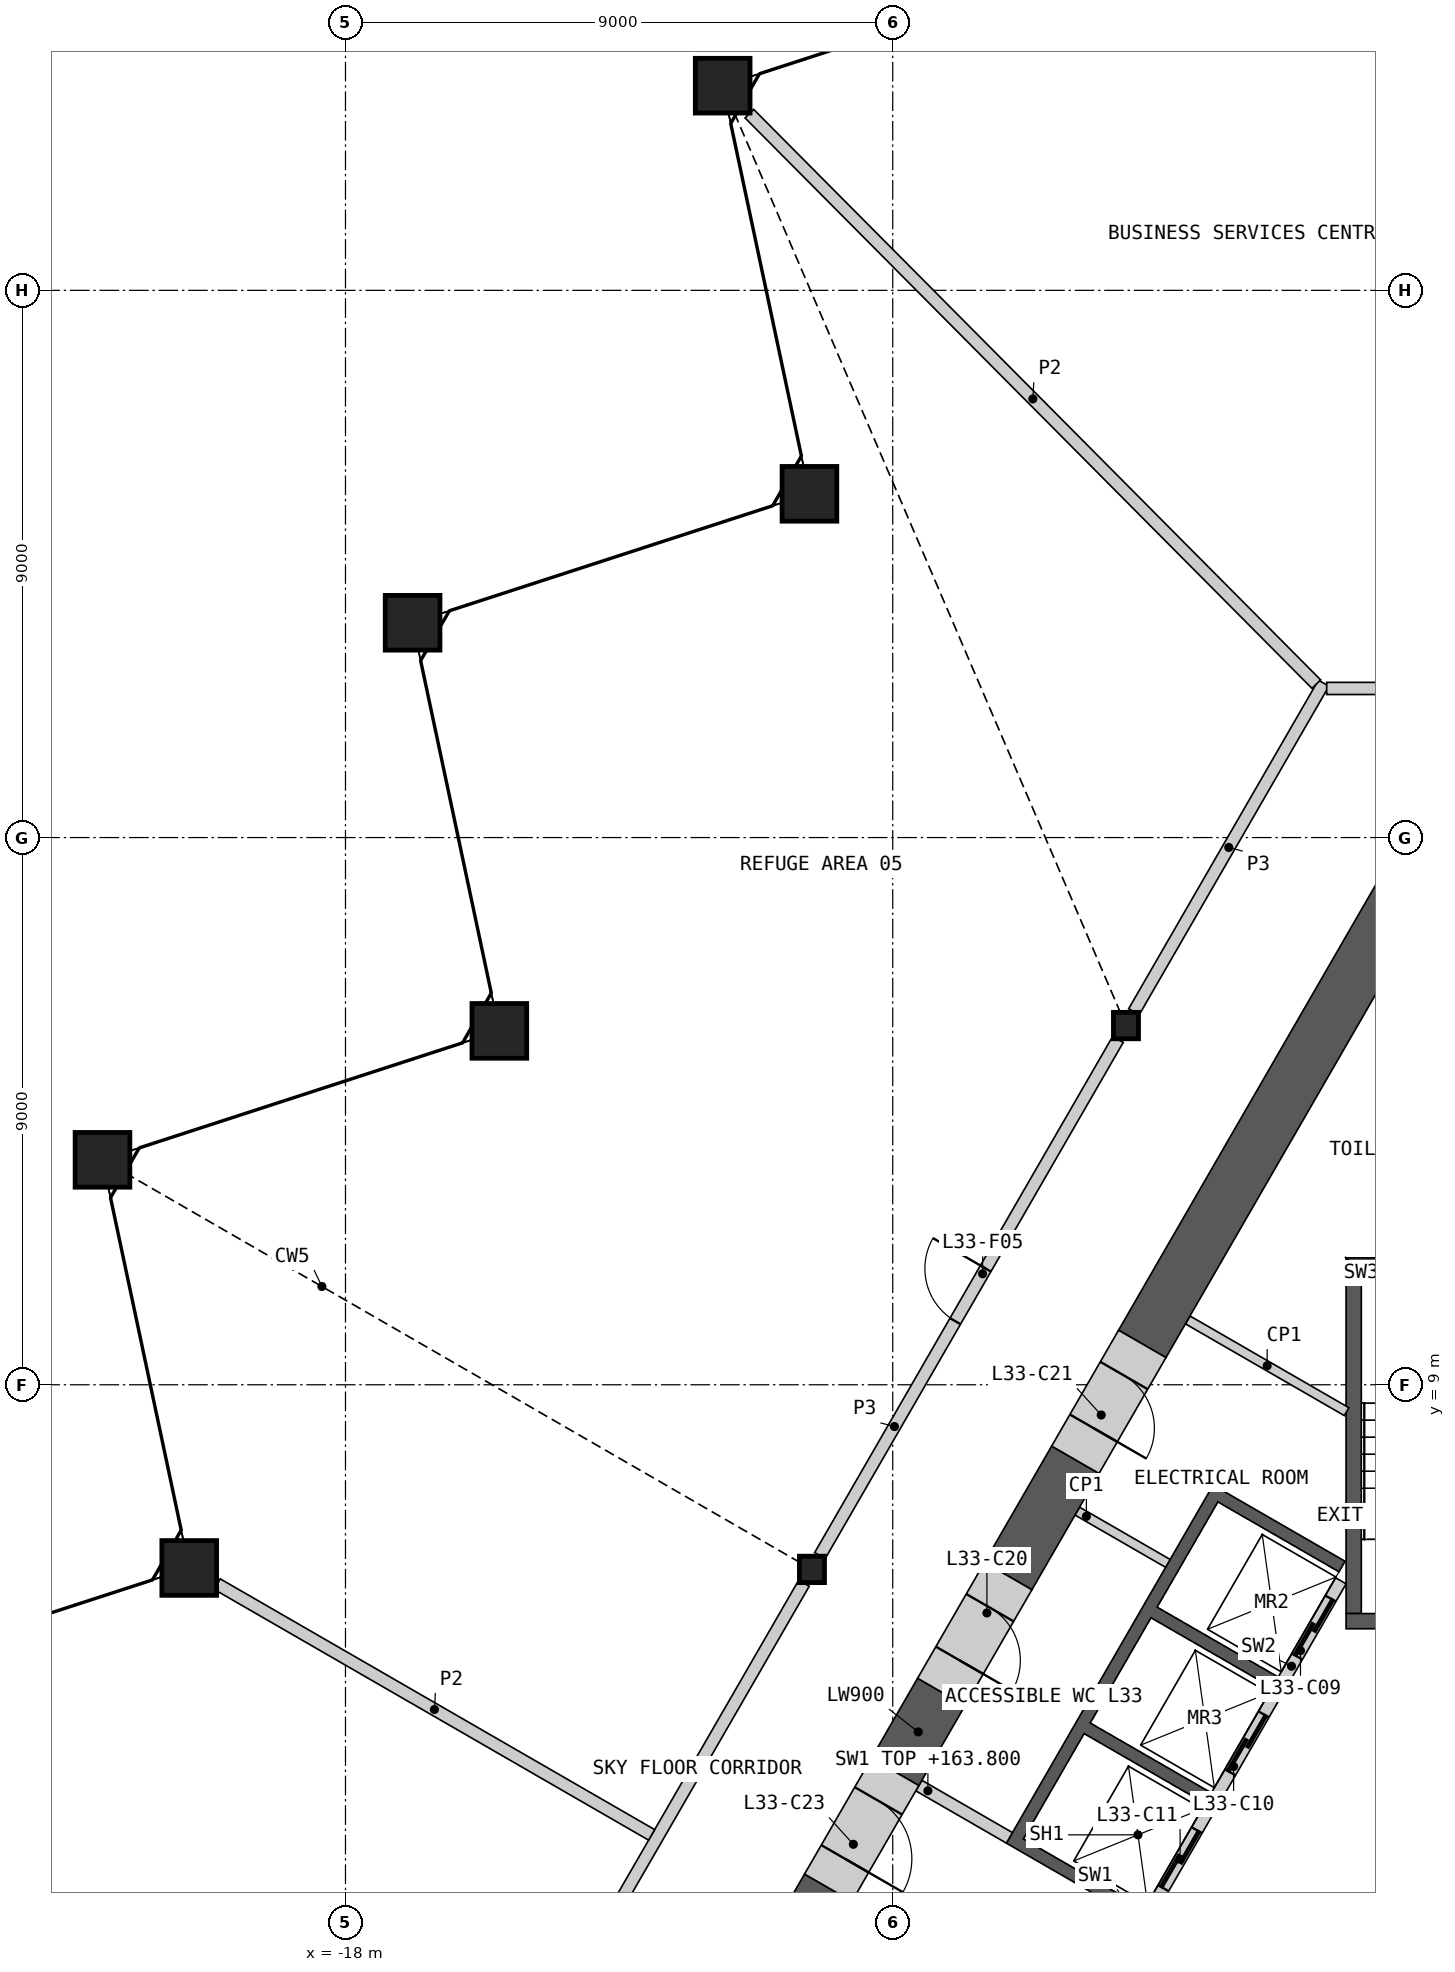
"""IFC4 building model, lengths in metres.
Left out: names, types, materials, properties, quantities, classifications, styles, units other than length and angle.
Written with IfcOpenShell. Run it as: python <this file> out.ifc"""

import sys

from ifc_helpers import new_model, si_unit, direction, frame, frame_2d, origin, origin_2d, place, context, subcontext, project, spatial, polyline, rectangle, hollow_rectangle, i_section, outline, extrude, element, fill, save


model = new_model("IFC4")
c1 = context("Model", 3, precision=1e-05, world=origin(), true_north=direction((0.0, 1.0)))
c2 = subcontext(c1, "Body", "Model", "MODEL_VIEW")
j1 = project(units=[si_unit("LENGTHUNIT", "METRE"), si_unit("PLANEANGLEUNIT", "RADIAN")], contexts=[c1])
p1 = place(None, origin())
s1 = spatial("IfcSite", under=j1, at=p1, CompositionType="ELEMENT")
p2 = place(p1, origin())
s2 = spatial("IfcBuilding", under=s1, at=p2, CompositionType="ELEMENT")
p3 = place(p2, frame((0.0, 0.0, 154.2)))
s3 = spatial("IfcBuildingStorey", under=s2, at=p3, CompositionType="ELEMENT", Elevation=154.2)
for number, where, z_axis, x_axis in (
    (1, (-11.796, 30.366, 0.0), (0.0, 0.0, 1.0), (1.0, 0.0, 0.0)),
    (2, (-10.37, 23.654, 0.0), (0.0, 0.0, 1.0), (1.0, 0.0, 0.0)),
    (3, (-16.896, 21.533, 0.0), (0.0, 0.0, 1.0), (1.0, 0.0, 0.0)),
    (4, (-15.469, 14.82, 0.0), (0.0, 0.0, 1.0), (1.0, 0.0, 0.0)),
    (5, (-21.996, 12.699, 0.0), (0.0, 0.0, 1.0), (1.0, 0.0, 0.0)),
    (6, (-20.57, 5.987, 0.0), (0.0, 0.0, 1.0), (1.0, 0.0, 0.0)),
):
    element("IfcColumn", number, at=place(p3, frame(where, z_axis=z_axis, x_axis=x_axis)), inside=s3, PredefinedType="COLUMN", context=c2, shape_type="SweptSolid", body=[
        extrude(hollow_rectangle(XDim=0.9, YDim=0.9, WallThickness=0.06, at=origin_2d()), origin(), (0.0, 0.0, 1.0), 10.0),
    ])
for number, where, z_axis, x_axis in (
    (7, (-5.164, 14.908, 0.0), (0.0, 0.0, 1.0), (1.0, 0.0, 0.0)),
    (8, (-10.328, 5.963, 0.0), (0.0, 0.0, 1.0), (1.0, 0.0, 0.0)),
):
    element("IfcColumn", number, at=place(p3, frame(where, z_axis=z_axis, x_axis=x_axis)), inside=s3, PredefinedType="COLUMN", context=c2, shape_type="SweptSolid", body=[
        extrude(i_section(OverallWidth=0.412, OverallDepth=0.435, WebThickness=0.036, FlangeThickness=0.057, at=origin_2d()), origin(), (0.0, 0.0, 1.0), 10.0),
    ])
p4 = place(p3, origin())
e9 = element("IfcWall", 9, at=p4, inside=s3, PredefinedType="SHEAR", context=c2, shape_type="SweptSolid", body=[
    extrude(outline(polyline([(-4.96, 0.208), (-7.131, 1.461), (-3.731, 7.35), (-1.561, 6.097), (-1.66, 5.924), (-3.652, 7.074), (-4.652, 5.342), (-2.66, 4.192), (-2.76, 4.019), (-4.752, 5.169), (-5.752, 3.437), (-3.76, 2.287), (-3.861, 2.113), (-5.852, 3.263), (-6.852, 1.531), (-4.861, 0.381), (-4.96, 0.208)])), origin(), (0.0, 0.0, 1.0), 9.6),
])
p5 = place(p3, frame((-1.631, 5.776, 0.0), z_axis=(0.0, 0.0, 1.0), x_axis=(-0.499992876559, -0.866029516466, 0.0)))
e10 = element("IfcWall", 10, at=p5, inside=s3, PredefinedType="SOLIDWALL", context=c2, shape_type="SweptSolid", body=[
    extrude(rectangle(XDim=6.486, YDim=0.2, at=frame_2d((3.243, 0.0))), origin(), (0.0, 0.0, 1.0), 9.6),
])
p6 = place(p5, frame((0.337, 0.0, 0.0)))
e11 = element("IfcOpeningElement", 11, at=p6, cuts=e10, PredefinedType="OPENING", context=c2, shape_type="SweptSolid", body=[
    extrude(rectangle(XDim=1.1, YDim=2.1, at=frame_2d((0.55, 1.05))), frame((0.0, 0.11, 0.0), z_axis=(0.0, -1.0, 0.0), x_axis=(1.0, 0.0, 0.0)), (0.0, 0.0, 1.0), 0.22),
])
p7 = place(p5, frame((2.537, 0.0, 0.0)))
e12 = element("IfcOpeningElement", 12, at=p7, cuts=e10, PredefinedType="OPENING", context=c2, shape_type="SweptSolid", body=[
    extrude(rectangle(XDim=1.1, YDim=2.1, at=frame_2d((0.55, 1.05))), frame((0.0, 0.11, 0.0), z_axis=(0.0, -1.0, 0.0), x_axis=(1.0, 0.0, 0.0)), (0.0, 0.0, 1.0), 0.22),
])
p8 = place(p5, frame((4.737, 0.0, 0.0)))
e13 = element("IfcOpeningElement", 13, at=p8, cuts=e10, PredefinedType="OPENING", context=c2, shape_type="SweptSolid", body=[
    extrude(rectangle(XDim=1.1, YDim=2.1, at=frame_2d((0.55, 1.05))), frame((0.0, 0.11, 0.0), z_axis=(0.0, -1.0, 0.0), x_axis=(1.0, 0.0, 0.0)), (0.0, 0.0, 1.0), 0.22),
])
p9 = place(p3, frame((-7.081, 1.548, 0.0), z_axis=(0.0, 0.0, 1.0), x_axis=(-0.865963414263, 0.500107353632, 0.0)))
e14 = element("IfcWall", 14, at=p9, inside=s3, PredefinedType="SHEAR", context=c2, shape_type="SweptSolid", body=[
    extrude(rectangle(XDim=1.72, YDim=0.2, at=frame_2d((0.86, 0.0))), origin(), (0.0, 0.0, 1.0), 9.6),
])
p10 = place(p3, origin())
e15 = element("IfcWall", 15, at=p10, inside=s3, PredefinedType="SHEAR", context=c2, shape_type="SweptSolid", body=[
    extrude(outline(polyline([(1.544, 11.087), (-1.544, 11.087), (-1.294, 10.837), (1.294, 10.837), (1.544, 11.087)])), origin(), (0.0, 0.0, 1.0), 9.6),
])
p11 = place(p3, origin())
e16 = element("IfcWall", 16, at=p11, inside=s3, PredefinedType="SHEAR", context=c2, shape_type="SweptSolid", body=[
    extrude(outline(polyline([(-1.294, 10.837), (-1.544, 11.087), (-1.544, 5.237), (-1.294, 5.237), (-1.294, 10.837)])), origin(), (0.0, 0.0, 1.0), 9.6),
])
p12 = place(p3, frame((1.544, 5.112, 0.0), z_axis=(0.0, 0.0, 1.0), x_axis=(-1.0, 0.0, 0.0)))
e17 = element("IfcWall", 17, at=p12, inside=s3, PredefinedType="SHEAR", context=c2, shape_type="SweptSolid", body=[
    extrude(rectangle(XDim=3.088, YDim=0.25, at=frame_2d((1.544, 0.0))), origin(), (0.0, 0.0, 1.0), 9.6),
])
p13 = place(p12, frame((0.994, 0.0, 0.0)))
e18 = element("IfcOpeningElement", 18, at=p13, cuts=e17, PredefinedType="OPENING", context=c2, shape_type="SweptSolid", body=[
    extrude(rectangle(XDim=1.1, YDim=2.1, at=frame_2d((0.55, 1.05))), frame((0.0, 0.135, 0.0), z_axis=(0.0, -1.0, 0.0), x_axis=(1.0, 0.0, 0.0)), (0.0, 0.0, 1.0), 0.27),
])
p14 = place(p3, frame((-5.964, 6.922, 0.0), z_axis=(0.0, 0.0, 1.0), x_axis=(0.866024871741, -0.500000921525, 0.0)))
e19 = element("IfcWall", 19, at=p14, inside=s3, PredefinedType="PARTITIONING", context=c2, shape_type="SweptSolid", body=[
    extrude(rectangle(XDim=1.72, YDim=0.15, at=frame_2d((0.86, 0.0))), origin(), (0.0, 0.0, 1.0), 9.6),
])
p15 = place(p3, frame((-4.149, 10.067, 0.0), z_axis=(0.0, 0.0, 1.0), x_axis=(0.865988872794, -0.500063268193, 0.0)))
e20 = element("IfcWall", 20, at=p15, inside=s3, PredefinedType="PARTITIONING", context=c2, shape_type="SweptSolid", body=[
    extrude(rectangle(XDim=3.018, YDim=0.15, at=frame_2d((1.509, 0.0))), origin(), (0.0, 0.0, 1.0), 9.6),
])
p16 = place(p3, frame((-0.39, 17.478, 0.0), z_axis=(0.0, 0.0, 1.0), x_axis=(-0.499999130374, -0.866025905863, 0.0)))
e21 = element("IfcWall", 21, at=p16, inside=s3, PredefinedType="SHEAR", context=c2, shape_type="SweptSolid", body=[
    extrude(rectangle(XDim=9.013, YDim=0.9, at=frame_2d((4.507, 0.0))), origin(), (0.0, 0.0, 1.0), 9.6),
])
p17 = place(p3, frame((-10.06, 0.728, 0.0), z_axis=(0.0, 0.0, 1.0), x_axis=(-0.499996331799, -0.866027521611, 0.0)))
e22 = element("IfcWall", 22, at=p17, inside=s3, PredefinedType="SHEAR", context=c2, shape_type="SweptSolid", body=[
    extrude(rectangle(XDim=4.295, YDim=0.9, at=frame_2d((2.148, 0.0))), origin(), (0.0, 0.0, 1.0), 9.6),
])
p18 = place(p3, frame((-5.996, 7.767, 0.0), z_axis=(0.0, 0.0, 1.0), x_axis=(-0.499990325971, -0.866030989016, 0.0)))
e23 = element("IfcWall", 23, at=p18, inside=s3, PredefinedType="SHEAR", context=c2, shape_type="SweptSolid", body=[
    extrude(rectangle(XDim=2.209, YDim=0.9, at=frame_2d((1.104, 0.0))), origin(), (0.0, 0.0, 1.0), 9.6),
])
p19 = place(p3, frame((-8.201, 3.948, 0.0), z_axis=(0.0, 0.0, 1.0), x_axis=(-0.499977585228, -0.866038344573, 0.0)))
e24 = element("IfcWall", 24, at=p19, inside=s3, PredefinedType="SHEAR", context=c2, shape_type="SweptSolid", body=[
    extrude(rectangle(XDim=1.519, YDim=0.9, at=frame_2d((0.759, 0.0))), origin(), (0.0, 0.0, 1.0), 9.6),
])
p20 = place(p3, frame((-7.101, 5.854, 0.0), z_axis=(0.0, 0.0, 1.0), x_axis=(-0.499898558967, -0.866083962871, 0.0)))
e25 = element("IfcWall", 25, at=p20, inside=s3, PredefinedType="SHEAR", context=c2, shape_type="SweptSolid", body=[
    extrude(rectangle(XDim=2.2, YDim=0.9, at=frame_2d((1.1, 0.0))), origin(), (0.0, 0.0, 1.0), 9.6),
])
p21 = place(p20, frame((0.6, 0.0, 0.0)))
e26 = element("IfcOpeningElement", 26, at=p21, cuts=e25, PredefinedType="OPENING", context=c2, shape_type="SweptSolid", body=[
    extrude(rectangle(XDim=1.0, YDim=2.1, at=frame_2d((0.5, 1.05))), frame((0.0, 0.46, 0.0), z_axis=(0.0, -1.0, 0.0), x_axis=(1.0, 0.0, 0.0)), (0.0, 0.0, 1.0), 0.92),
])
p22 = place(p3, frame((-4.896, 9.672, 0.0), z_axis=(0.0, 0.0, 1.0), x_axis=(-0.50002983664, -0.866008176907, 0.0)))
e27 = element("IfcWall", 27, at=p22, inside=s3, PredefinedType="SHEAR", context=c2, shape_type="SweptSolid", body=[
    extrude(rectangle(XDim=2.2, YDim=0.9, at=frame_2d((1.1, 0.0))), origin(), (0.0, 0.0, 1.0), 9.6),
])
p23 = place(p22, frame((0.6, 0.0, 0.0)))
e28 = element("IfcOpeningElement", 28, at=p23, cuts=e27, PredefinedType="OPENING", context=c2, shape_type="SweptSolid", body=[
    extrude(rectangle(XDim=1.0, YDim=2.1, at=frame_2d((0.5, 1.05))), frame((0.0, 0.46, 0.0), z_axis=(0.0, -1.0, 0.0), x_axis=(1.0, 0.0, 0.0)), (0.0, 0.0, 1.0), 0.92),
])
p24 = place(p3, frame((-8.96, 2.633, 0.0), z_axis=(0.0, 0.0, 1.0), x_axis=(-0.50002983664, -0.866008176907, 0.0)))
e29 = element("IfcWall", 29, at=p24, inside=s3, PredefinedType="SHEAR", context=c2, shape_type="SweptSolid", body=[
    extrude(rectangle(XDim=2.2, YDim=0.9, at=frame_2d((1.1, 0.0))), origin(), (0.0, 0.0, 1.0), 9.6),
])
p25 = place(p24, frame((0.55, 0.0, 0.0)))
e30 = element("IfcOpeningElement", 30, at=p25, cuts=e29, PredefinedType="OPENING", context=c2, shape_type="SweptSolid", body=[
    extrude(rectangle(XDim=1.1, YDim=2.1, at=frame_2d((0.55, 1.05))), frame((0.0, 0.46, 0.0), z_axis=(0.0, -1.0, 0.0), x_axis=(1.0, 0.0, 0.0)), (0.0, 0.0, 1.0), 0.92),
])
p26 = place(p3, frame((-15.361, -2.754, 0.0), z_axis=(0.0, 0.0, 1.0), x_axis=(0.500004141693, 0.866023012564, 0.0)))
e31 = element("IfcWall", 31, at=p26, inside=s3, PredefinedType="PARTITIONING", context=c2, shape_type="SweptSolid", body=[
    extrude(rectangle(XDim=9.803, YDim=0.2, at=frame_2d((4.902, 0.0))), origin(), (0.0, 0.0, 1.0), 9.6),
])
p27 = place(p3, frame((-10.197, 6.19, 0.0), z_axis=(0.0, 0.0, 1.0), x_axis=(0.500012035596, 0.866018454918, 0.0)))
e32 = element("IfcWall", 32, at=p27, inside=s3, PredefinedType="PARTITIONING", context=c2, shape_type="SweptSolid", body=[
    extrude(rectangle(XDim=9.803, YDim=0.2, at=frame_2d((4.902, 0.0))), origin(), (0.0, 0.0, 1.0), 9.6),
])
p28 = place(p27, frame((4.452, 0.0, 0.0)))
e33 = element("IfcOpeningElement", 33, at=p28, cuts=e32, PredefinedType="OPENING", context=c2, shape_type="SweptSolid", body=[
    extrude(rectangle(XDim=1.0, YDim=2.1, at=frame_2d((0.5, 1.05))), frame((0.0, 0.11, 0.0), z_axis=(0.0, -1.0, 0.0), x_axis=(1.0, 0.0, 0.0)), (0.0, 0.0, 1.0), 0.22),
])
p29 = place(p3, frame((-5.033, 15.135, 0.0), z_axis=(0.0, 0.0, 1.0), x_axis=(0.499980978912, 0.866036385336, 0.0)))
e34 = element("IfcWall", 34, at=p29, inside=s3, PredefinedType="PARTITIONING", context=c2, shape_type="SweptSolid", body=[
    extrude(rectangle(XDim=6.24, YDim=0.2, at=frame_2d((3.12, 0.0))), origin(), (0.0, 0.0, 1.0), 9.6),
])
p30 = place(p3, frame((-1.863, 20.453, 0.0), z_axis=(0.0, 0.0, 1.0), x_axis=(1.0, 0.0, 0.0)))
e35 = element("IfcWall", 35, at=p30, inside=s3, PredefinedType="PARTITIONING", context=c2, shape_type="SweptSolid", body=[
    extrude(rectangle(XDim=3.726, YDim=0.2, at=frame_2d((1.863, 0.0))), origin(), (0.0, 0.0, 1.0), 9.6),
])
p31 = place(p3, frame((-11.358, 29.906, 0.0), z_axis=(0.0, 0.0, 1.0), x_axis=(0.704897825138, -0.709308858055, 0.0)))
e36 = element("IfcWall", 36, at=p31, inside=s3, PredefinedType="PARTITIONING", context=c2, shape_type="SweptSolid", body=[
    extrude(rectangle(XDim=13.228, YDim=0.2, at=frame_2d((6.614, 0.0))), origin(), (0.0, 0.0, 1.0), 8.685),
])
p32 = place(p3, frame((-20.11, 5.721, 0.0), z_axis=(0.0, 0.0, 1.0), x_axis=(0.866032814021, -0.499987164874, 0.0)))
e37 = element("IfcWall", 37, at=p32, inside=s3, PredefinedType="PARTITIONING", context=c2, shape_type="SweptSolid", body=[
    extrude(rectangle(XDim=8.25, YDim=0.2, at=frame_2d((4.125, 0.0))), origin(), (0.0, 0.0, 1.0), 8.685),
])
p33 = place(p6, origin())
e38 = element("IfcDoor", 38, at=p33, inside=s3, OperationType="SLIDING_TO_LEFT", PredefinedType="DOOR", context=c2, shape_type="SweptSolid", body=[
    extrude(rectangle(XDim=1.1, YDim=2.1, at=frame_2d((0.55, 1.05))), frame((0.0, 0.025, 0.0), z_axis=(0.0, -1.0, 0.0), x_axis=(1.0, 0.0, 0.0)), (0.0, 0.0, 1.0), 0.05),
])
fill(e11, e38)
p34 = place(p7, origin())
e39 = element("IfcDoor", 39, at=p34, inside=s3, OperationType="SLIDING_TO_LEFT", PredefinedType="DOOR", context=c2, shape_type="SweptSolid", body=[
    extrude(rectangle(XDim=1.1, YDim=2.1, at=frame_2d((0.55, 1.05))), frame((0.0, 0.025, 0.0), z_axis=(0.0, -1.0, 0.0), x_axis=(1.0, 0.0, 0.0)), (0.0, 0.0, 1.0), 0.05),
])
fill(e12, e39)
p35 = place(p8, origin())
e40 = element("IfcDoor", 40, at=p35, inside=s3, OperationType="SLIDING_TO_LEFT", PredefinedType="DOOR", context=c2, shape_type="SweptSolid", body=[
    extrude(rectangle(XDim=1.1, YDim=2.1, at=frame_2d((0.55, 1.05))), frame((0.0, 0.025, 0.0), z_axis=(0.0, -1.0, 0.0), x_axis=(1.0, 0.0, 0.0)), (0.0, 0.0, 1.0), 0.05),
])
fill(e13, e40)
p36 = place(p21, origin())
e41 = element("IfcDoor", 41, at=p36, inside=s3, OperationType="SINGLE_SWING_RIGHT", PredefinedType="DOOR", context=c2, shape_type="SweptSolid", body=[
    extrude(rectangle(XDim=1.0, YDim=2.1, at=frame_2d((0.5, 1.05))), frame((0.0, 0.205, 0.0), z_axis=(0.0, -1.0, 0.0), x_axis=(1.0, 0.0, 0.0)), (0.0, 0.0, 1.0), 0.05),
])
fill(e26, e41)
p37 = place(p23, origin())
e42 = element("IfcDoor", 42, at=p37, inside=s3, OperationType="SINGLE_SWING_RIGHT", PredefinedType="DOOR", context=c2, shape_type="SweptSolid", body=[
    extrude(rectangle(XDim=1.0, YDim=2.1, at=frame_2d((0.5, 1.05))), frame((0.0, 0.205, 0.0), z_axis=(0.0, -1.0, 0.0), x_axis=(1.0, 0.0, 0.0)), (0.0, 0.0, 1.0), 0.05),
])
fill(e28, e42)
p38 = place(p25, origin())
e43 = element("IfcDoor", 43, at=p38, inside=s3, OperationType="SINGLE_SWING_RIGHT", PredefinedType="DOOR", context=c2, shape_type="SweptSolid", body=[
    extrude(rectangle(XDim=1.1, YDim=2.1, at=frame_2d((0.55, 1.05))), frame((0.0, 0.205, 0.0), z_axis=(0.0, -1.0, 0.0), x_axis=(1.0, 0.0, 0.0)), (0.0, 0.0, 1.0), 0.05),
])
fill(e30, e43)
p39 = place(p28, origin())
e44 = element("IfcDoor", 44, at=p39, inside=s3, OperationType="SINGLE_SWING_RIGHT", PredefinedType="DOOR", context=c2, shape_type="SweptSolid", body=[
    extrude(rectangle(XDim=1.0, YDim=2.1, at=frame_2d((0.5, 1.05))), frame((0.0, 0.025, 0.0), z_axis=(0.0, -1.0, 0.0), x_axis=(1.0, 0.0, 0.0)), (0.0, 0.0, 1.0), 0.05),
])
fill(e33, e44)
save(model, sys.argv[1])
